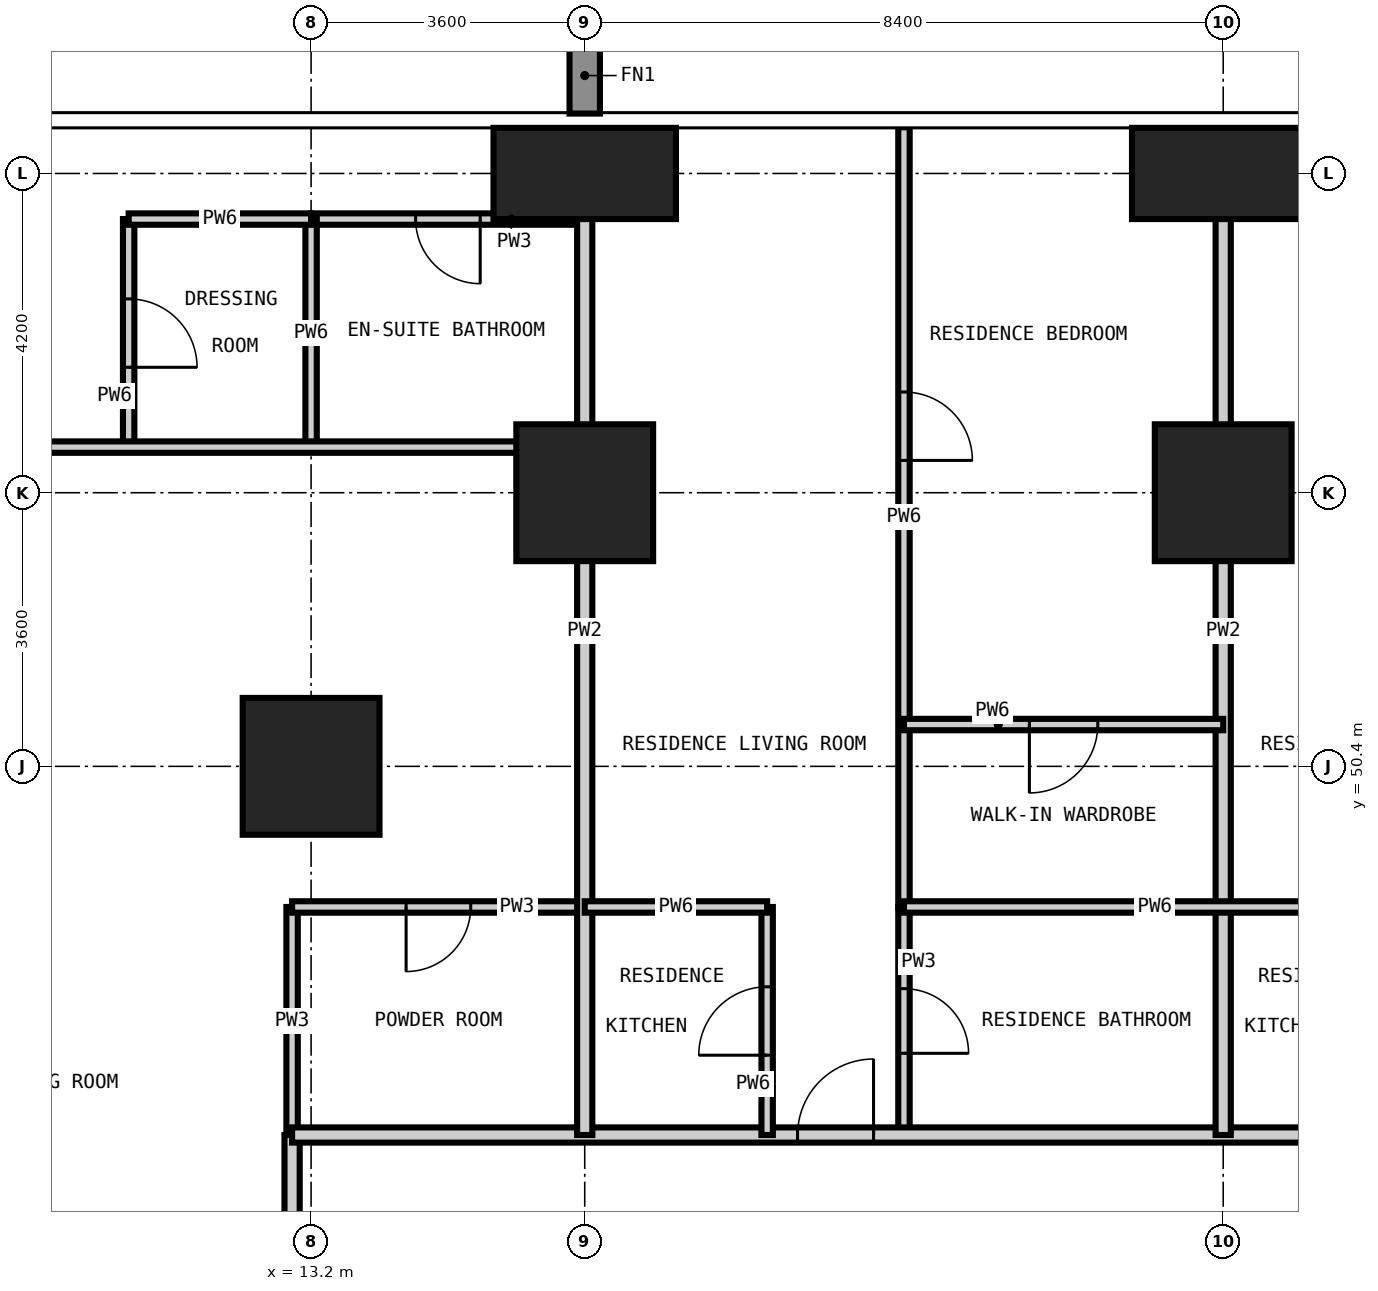
"""IFC4 building model, lengths in metres.
Left out: names, types, materials, properties, quantities, classifications, styles, units other than length and angle.
Written with IfcOpenShell. Run it as: python <this file> out.ifc"""

import sys

from ifc_helpers import new_model, si_unit, direction, frame, frame_2d, origin, origin_2d, place, context, subcontext, project, spatial, rectangle, extrude, element, fill, save


model = new_model("IFC4")
c1 = context("Model", 3, precision=1e-05, world=origin(), true_north=direction((0.0, 1.0)))
c2 = subcontext(c1, "Body", "Model", "MODEL_VIEW")
j1 = project(units=[si_unit("LENGTHUNIT", "METRE"), si_unit("PLANEANGLEUNIT", "RADIAN")], contexts=[c1])
p1 = place(None, origin())
s1 = spatial("IfcSite", under=j1, at=p1, CompositionType="ELEMENT")
p2 = place(p1, origin())
s2 = spatial("IfcBuilding", under=s1, at=p2, CompositionType="ELEMENT")
p3 = place(p2, frame((0.0, 0.0, 45.0)))
s3 = spatial("IfcBuildingStorey", under=s2, at=p3, CompositionType="ELEMENT", Elevation=45.0)
for number, where, z_axis, x_axis in (
    (1, (13.2, 50.4, -0.35), (0.0, 0.0, 1.0), (1.0, 0.0, 0.0)),
    (2, (16.8, 54.0, -0.35), (0.0, 0.0, 1.0), (1.0, 0.0, 0.0)),
):
    element("IfcColumn", number, at=place(p3, frame(where, z_axis=z_axis, x_axis=x_axis)), inside=s3, PredefinedType="COLUMN", context=c2, shape_type="SweptSolid", body=[
        extrude(rectangle(XDim=1.8, YDim=1.8, at=origin_2d()), origin(), (0.0, 0.0, 1.0), 3.6),
    ])
p4 = place(p3, frame((16.8, 58.2, -0.35), z_axis=(0.0, 0.0, 1.0), x_axis=(1.0, 0.0, 0.0)))
e3 = element("IfcColumn", 3, at=p4, inside=s3, PredefinedType="COLUMN", context=c2, shape_type="SweptSolid", body=[
    extrude(rectangle(XDim=2.4, YDim=1.2, at=origin_2d()), origin(), (0.0, 0.0, 1.0), 3.6),
])
p5 = place(p3, frame((25.2, 54.0, -0.35), z_axis=(0.0, 0.0, 1.0), x_axis=(1.0, 0.0, 0.0)))
e4 = element("IfcColumn", 4, at=p5, inside=s3, PredefinedType="COLUMN", context=c2, shape_type="SweptSolid", body=[
    extrude(rectangle(XDim=1.8, YDim=1.8, at=origin_2d()), origin(), (0.0, 0.0, 1.0), 3.6),
])
p6 = place(p3, frame((25.2, 58.2, -0.35), z_axis=(0.0, 0.0, 1.0), x_axis=(1.0, 0.0, 0.0)))
e5 = element("IfcColumn", 5, at=p6, inside=s3, PredefinedType="COLUMN", context=c2, shape_type="SweptSolid", body=[
    extrude(rectangle(XDim=2.4, YDim=1.2, at=origin_2d()), origin(), (0.0, 0.0, 1.0), 3.6),
])
p7 = place(p3, frame((12.95, 45.55, 0.0), z_axis=(0.0, 0.0, 1.0), x_axis=(0.0, 1.0, 0.0)))
e6 = element("IfcWall", 6, at=p7, inside=s3, PredefinedType="PARTITIONING", context=c2, shape_type="SweptSolid", body=[
    extrude(rectangle(XDim=3.0, YDim=0.15, at=frame_2d((1.5, 0.0))), origin(), (0.0, 0.0, 1.0), 3.25),
])
p8 = place(p3, frame((21.0, 45.55, 0.0), z_axis=(0.0, 0.0, 1.0), x_axis=(0.0, 1.0, 0.0)))
e7 = element("IfcWall", 7, at=p8, inside=s3, PredefinedType="PARTITIONING", context=c2, shape_type="SweptSolid", body=[
    extrude(rectangle(XDim=3.0, YDim=0.15, at=frame_2d((1.5, 0.0))), origin(), (0.0, 0.0, 1.0), 3.25),
])
p9 = place(p8, frame((1.075, 0.0, 0.0)))
e8 = element("IfcOpeningElement", 8, at=p9, cuts=e7, PredefinedType="OPENING", context=c2, shape_type="SweptSolid", body=[
    extrude(rectangle(XDim=0.85, YDim=2.1, at=frame_2d((0.425, 1.05))), frame((0.0, 0.085, 0.0), z_axis=(0.0, -1.0, 0.0), x_axis=(1.0, 0.0, 0.0)), (0.0, 0.0, 1.0), 0.17),
])
p10 = place(p3, frame((12.95, 48.55, 0.0), z_axis=(0.0, 0.0, 1.0), x_axis=(1.0, 0.0, 0.0)))
e9 = element("IfcWall", 9, at=p10, inside=s3, PredefinedType="PARTITIONING", context=c2, shape_type="SweptSolid", body=[
    extrude(rectangle(XDim=3.85, YDim=0.15, at=frame_2d((1.925, 0.0))), origin(), (0.0, 0.0, 1.0), 3.25),
])
p11 = place(p10, frame((1.5, 0.0, 0.0)))
e10 = element("IfcOpeningElement", 10, at=p11, cuts=e9, PredefinedType="OPENING", context=c2, shape_type="SweptSolid", body=[
    extrude(rectangle(XDim=0.85, YDim=2.1, at=frame_2d((0.425, 1.05))), frame((0.0, 0.085, 0.0), z_axis=(0.0, -1.0, 0.0), x_axis=(1.0, 0.0, 0.0)), (0.0, 0.0, 1.0), 0.17),
])
p12 = place(p3, frame((13.2, 57.6, 0.0), z_axis=(0.0, 0.0, 1.0), x_axis=(1.0, 0.0, 0.0)))
e11 = element("IfcWall", 11, at=p12, inside=s3, PredefinedType="PARTITIONING", context=c2, shape_type="SweptSolid", body=[
    extrude(rectangle(XDim=3.6, YDim=0.15, at=frame_2d((1.8, 0.0))), origin(), (0.0, 0.0, 1.0), 3.25),
])
p13 = place(p12, frame((1.375, 0.0, 0.0)))
e12 = element("IfcOpeningElement", 12, at=p13, cuts=e11, PredefinedType="OPENING", context=c2, shape_type="SweptSolid", body=[
    extrude(rectangle(XDim=0.85, YDim=2.1, at=frame_2d((0.425, 1.05))), frame((0.0, 0.085, 0.0), z_axis=(0.0, -1.0, 0.0), x_axis=(1.0, 0.0, 0.0)), (0.0, 0.0, 1.0), 0.17),
])
p14 = place(p3, frame((12.95, 12.95, 0.0), z_axis=(0.0, 0.0, 1.0), x_axis=(0.0, 1.0, 0.0)))
e13 = element("IfcWall", 13, at=p14, inside=s3, PredefinedType="PARTITIONING", context=c2, shape_type="SweptSolid", body=[
    extrude(rectangle(XDim=32.6, YDim=0.2, at=frame_2d((16.3, 0.0))), origin(), (0.0, 0.0, 1.0), 3.25),
])
p15 = place(p14, frame((8.45, 0.0, 0.0)))
e14 = element("IfcOpeningElement", 14, at=p15, cuts=e13, PredefinedType="OPENING", context=c2, shape_type="SweptSolid", body=[
    extrude(rectangle(XDim=1.0, YDim=2.2, at=frame_2d((0.5, 1.1))), frame((0.0, 0.11, 0.0), z_axis=(0.0, -1.0, 0.0), x_axis=(1.0, 0.0, 0.0)), (0.0, 0.0, 1.0), 0.22),
])
p16 = place(p14, frame((16.7, 0.0, 0.0)))
e15 = element("IfcOpeningElement", 15, at=p16, cuts=e13, PredefinedType="OPENING", context=c2, shape_type="SweptSolid", body=[
    extrude(rectangle(XDim=1.0, YDim=2.2, at=frame_2d((0.5, 1.1))), frame((0.0, 0.11, 0.0), z_axis=(0.0, -1.0, 0.0), x_axis=(1.0, 0.0, 0.0)), (0.0, 0.0, 1.0), 0.22),
])
p17 = place(p14, frame((23.6, 0.0, 0.0)))
e16 = element("IfcOpeningElement", 16, at=p17, cuts=e13, PredefinedType="OPENING", context=c2, shape_type="SweptSolid", body=[
    extrude(rectangle(XDim=1.0, YDim=2.2, at=frame_2d((0.5, 1.1))), frame((0.0, 0.11, 0.0), z_axis=(0.0, -1.0, 0.0), x_axis=(1.0, 0.0, 0.0)), (0.0, 0.0, 1.0), 0.22),
])
p18 = place(p14, frame((25.1, 0.0, 0.0)))
e17 = element("IfcOpeningElement", 17, at=p18, cuts=e13, PredefinedType="OPENING", context=c2, shape_type="SweptSolid", body=[
    extrude(rectangle(XDim=1.0, YDim=2.2, at=frame_2d((0.5, 1.1))), frame((0.0, 0.11, 0.0), z_axis=(0.0, -1.0, 0.0), x_axis=(1.0, 0.0, 0.0)), (0.0, 0.0, 1.0), 0.22),
])
p19 = place(p14, frame((1.425, 0.0, 0.0)))
e18 = element("IfcOpeningElement", 18, at=p19, cuts=e13, PredefinedType="OPENING", context=c2, shape_type="SweptSolid", body=[
    extrude(rectangle(XDim=1.0, YDim=2.2, at=frame_2d((0.5, 1.1))), frame((0.0, 0.11, 0.0), z_axis=(0.0, -1.0, 0.0), x_axis=(1.0, 0.0, 0.0)), (0.0, 0.0, 1.0), 0.22),
])
p20 = place(p14, frame((30.325, 0.0, 0.0)))
e19 = element("IfcOpeningElement", 19, at=p20, cuts=e13, PredefinedType="OPENING", context=c2, shape_type="SweptSolid", body=[
    extrude(rectangle(XDim=1.0, YDim=2.2, at=frame_2d((0.5, 1.1))), frame((0.0, 0.11, 0.0), z_axis=(0.0, -1.0, 0.0), x_axis=(1.0, 0.0, 0.0)), (0.0, 0.0, 1.0), 0.22),
])
p21 = place(p3, frame((12.95, 45.55, 0.0), z_axis=(0.0, 0.0, 1.0), x_axis=(1.0, 0.0, 0.0)))
e20 = element("IfcWall", 20, at=p21, inside=s3, PredefinedType="PARTITIONING", context=c2, shape_type="SweptSolid", body=[
    extrude(rectangle(XDim=32.3, YDim=0.2, at=frame_2d((16.15, 0.0))), origin(), (0.0, 0.0, 1.0), 3.25),
])
p22 = place(p21, frame((6.65, 0.0, 0.0)))
e21 = element("IfcOpeningElement", 21, at=p22, cuts=e20, PredefinedType="OPENING", context=c2, shape_type="SweptSolid", body=[
    extrude(rectangle(XDim=1.0, YDim=2.2, at=frame_2d((0.5, 1.1))), frame((0.0, 0.11, 0.0), z_axis=(0.0, -1.0, 0.0), x_axis=(1.0, 0.0, 0.0)), (0.0, 0.0, 1.0), 0.22),
])
p23 = place(p21, frame((15.05, 0.0, 0.0)))
e22 = element("IfcOpeningElement", 22, at=p23, cuts=e20, PredefinedType="OPENING", context=c2, shape_type="SweptSolid", body=[
    extrude(rectangle(XDim=1.0, YDim=2.2, at=frame_2d((0.5, 1.1))), frame((0.0, 0.11, 0.0), z_axis=(0.0, -1.0, 0.0), x_axis=(1.0, 0.0, 0.0)), (0.0, 0.0, 1.0), 0.22),
])
p24 = place(p21, frame((23.45, 0.0, 0.0)))
e23 = element("IfcOpeningElement", 23, at=p24, cuts=e20, PredefinedType="OPENING", context=c2, shape_type="SweptSolid", body=[
    extrude(rectangle(XDim=1.0, YDim=2.2, at=frame_2d((0.5, 1.1))), frame((0.0, 0.11, 0.0), z_axis=(0.0, -1.0, 0.0), x_axis=(1.0, 0.0, 0.0)), (0.0, 0.0, 1.0), 0.22),
])
for number, where, z_axis, x_axis in (
    (24, (16.8, 45.55, 0.0), (0.0, 0.0, 1.0), (0.0, 1.0, 0.0)),
    (25, (25.2, 45.55, 0.0), (0.0, 0.0, 1.0), (0.0, 1.0, 0.0)),
):
    element("IfcWall", number, at=place(p3, frame(where, z_axis=z_axis, x_axis=x_axis)), inside=s3, PredefinedType="PARTITIONING", context=c2, shape_type="SweptSolid", body=[
        extrude(rectangle(XDim=13.258, YDim=0.2, at=frame_2d((6.629, 0.0))), origin(), (0.0, 0.0, 1.0), 3.25),
    ])
p25 = place(p3, frame((10.8, 54.6, 0.0), z_axis=(0.0, 0.0, 1.0), x_axis=(0.0, 1.0, 0.0)))
e26 = element("IfcWall", 26, at=p25, inside=s3, PredefinedType="PARTITIONING", context=c2, shape_type="SweptSolid", body=[
    extrude(rectangle(XDim=3.0, YDim=0.15, at=frame_2d((1.5, 0.0))), origin(), (0.0, 0.0, 1.0), 3.25),
])
p26 = place(p25, frame((1.05, 0.0, 0.0)))
e27 = element("IfcOpeningElement", 27, at=p26, cuts=e26, PredefinedType="OPENING", context=c2, shape_type="SweptSolid", body=[
    extrude(rectangle(XDim=0.9, YDim=2.1, at=frame_2d((0.45, 1.05))), frame((0.0, 0.085, 0.0), z_axis=(0.0, -1.0, 0.0), x_axis=(1.0, 0.0, 0.0)), (0.0, 0.0, 1.0), 0.17),
])
p27 = place(p3, frame((13.2, 54.6, 0.0), z_axis=(0.0, 0.0, 1.0), x_axis=(0.0, 1.0, 0.0)))
e28 = element("IfcWall", 28, at=p27, inside=s3, PredefinedType="PARTITIONING", context=c2, shape_type="SweptSolid", body=[
    extrude(rectangle(XDim=3.0, YDim=0.15, at=frame_2d((1.5, 0.0))), origin(), (0.0, 0.0, 1.0), 3.25),
])
p28 = place(p3, frame((19.2, 45.55, 0.0), z_axis=(0.0, 0.0, 1.0), x_axis=(0.0, 1.0, 0.0)))
e29 = element("IfcWall", 29, at=p28, inside=s3, PredefinedType="PARTITIONING", context=c2, shape_type="SweptSolid", body=[
    extrude(rectangle(XDim=3.0, YDim=0.15, at=frame_2d((1.5, 0.0))), origin(), (0.0, 0.0, 1.0), 3.25),
])
p29 = place(p28, frame((1.05, 0.0, 0.0)))
e30 = element("IfcOpeningElement", 30, at=p29, cuts=e29, PredefinedType="OPENING", context=c2, shape_type="SweptSolid", body=[
    extrude(rectangle(XDim=0.9, YDim=2.1, at=frame_2d((0.45, 1.05))), frame((0.0, 0.085, 0.0), z_axis=(0.0, -1.0, 0.0), x_axis=(1.0, 0.0, 0.0)), (0.0, 0.0, 1.0), 0.17),
])
p30 = place(p3, frame((21.0, 48.55, 0.0), z_axis=(0.0, 0.0, 1.0), x_axis=(0.0, 1.0, 0.0)))
e31 = element("IfcWall", 31, at=p30, inside=s3, PredefinedType="PARTITIONING", context=c2, shape_type="SweptSolid", body=[
    extrude(rectangle(XDim=10.258, YDim=0.15, at=frame_2d((5.129, 0.0))), origin(), (0.0, 0.0, 1.0), 3.25),
])
p31 = place(p30, frame((5.875, 0.0, 0.0)))
e32 = element("IfcOpeningElement", 32, at=p31, cuts=e31, PredefinedType="OPENING", context=c2, shape_type="SweptSolid", body=[
    extrude(rectangle(XDim=0.9, YDim=2.1, at=frame_2d((0.45, 1.05))), frame((0.0, 0.085, 0.0), z_axis=(0.0, -1.0, 0.0), x_axis=(1.0, 0.0, 0.0)), (0.0, 0.0, 1.0), 0.17),
])
p32 = place(p3, frame((16.8, 48.55, 0.0), z_axis=(0.0, 0.0, 1.0), x_axis=(1.0, 0.0, 0.0)))
e33 = element("IfcWall", 33, at=p32, inside=s3, PredefinedType="PARTITIONING", context=c2, shape_type="SweptSolid", body=[
    extrude(rectangle(XDim=2.4, YDim=0.15, at=frame_2d((1.2, 0.0))), origin(), (0.0, 0.0, 1.0), 3.25),
])
p33 = place(p3, frame((21.0, 48.55, 0.0), z_axis=(0.0, 0.0, 1.0), x_axis=(1.0, 0.0, 0.0)))
e34 = element("IfcWall", 34, at=p33, inside=s3, PredefinedType="PARTITIONING", context=c2, shape_type="SweptSolid", body=[
    extrude(rectangle(XDim=6.6, YDim=0.15, at=frame_2d((3.3, 0.0))), origin(), (0.0, 0.0, 1.0), 3.25),
])
p34 = place(p3, frame((21.0, 50.95, 0.0), z_axis=(0.0, 0.0, 1.0), x_axis=(1.0, 0.0, 0.0)))
e35 = element("IfcWall", 35, at=p34, inside=s3, PredefinedType="PARTITIONING", context=c2, shape_type="SweptSolid", body=[
    extrude(rectangle(XDim=4.2, YDim=0.15, at=frame_2d((2.1, 0.0))), origin(), (0.0, 0.0, 1.0), 3.25),
])
p35 = place(p34, frame((1.65, 0.0, 0.0)))
e36 = element("IfcOpeningElement", 36, at=p35, cuts=e35, PredefinedType="OPENING", context=c2, shape_type="SweptSolid", body=[
    extrude(rectangle(XDim=0.9, YDim=2.1, at=frame_2d((0.45, 1.05))), frame((0.0, 0.085, 0.0), z_axis=(0.0, -1.0, 0.0), x_axis=(1.0, 0.0, 0.0)), (0.0, 0.0, 1.0), 0.17),
])
p36 = place(p3, frame((-0.008, 54.6, 0.0), z_axis=(0.0, 0.0, 1.0), x_axis=(1.0, 0.0, 0.0)))
e37 = element("IfcWall", 37, at=p36, inside=s3, PredefinedType="PARTITIONING", context=c2, shape_type="SweptSolid", body=[
    extrude(rectangle(XDim=16.808, YDim=0.15, at=frame_2d((8.404, 0.0))), origin(), (0.0, 0.0, 1.0), 3.25),
])
p37 = place(p36, frame((4.958, 0.0, 0.0)))
e38 = element("IfcOpeningElement", 38, at=p37, cuts=e37, PredefinedType="OPENING", context=c2, shape_type="SweptSolid", body=[
    extrude(rectangle(XDim=0.9, YDim=2.1, at=frame_2d((0.45, 1.05))), frame((0.0, 0.085, 0.0), z_axis=(0.0, -1.0, 0.0), x_axis=(1.0, 0.0, 0.0)), (0.0, 0.0, 1.0), 0.17),
])
p38 = place(p3, frame((10.8, 57.6, 0.0), z_axis=(0.0, 0.0, 1.0), x_axis=(1.0, 0.0, 0.0)))
e39 = element("IfcWall", 39, at=p38, inside=s3, PredefinedType="PARTITIONING", context=c2, shape_type="SweptSolid", body=[
    extrude(rectangle(XDim=2.4, YDim=0.15, at=frame_2d((1.2, 0.0))), origin(), (0.0, 0.0, 1.0), 3.25),
])
p39 = place(p22, origin())
e40 = element("IfcDoor", 40, at=p39, inside=s3, OperationType="SINGLE_SWING_RIGHT", PredefinedType="DOOR", context=c2, shape_type="SweptSolid", body=[
    extrude(rectangle(XDim=1.0, YDim=2.2, at=frame_2d((0.5, 1.1))), frame((0.0, 0.025, 0.0), z_axis=(0.0, -1.0, 0.0), x_axis=(1.0, 0.0, 0.0)), (0.0, 0.0, 1.0), 0.05),
])
fill(e21, e40)
p40 = place(p29, origin())
e41 = element("IfcDoor", 41, at=p40, inside=s3, OperationType="SINGLE_SWING_LEFT", PredefinedType="DOOR", context=c2, shape_type="SweptSolid", body=[
    extrude(rectangle(XDim=0.9, YDim=2.1, at=frame_2d((0.45, 1.05))), frame((0.0, 0.025, 0.0), z_axis=(0.0, -1.0, 0.0), x_axis=(1.0, 0.0, 0.0)), (0.0, 0.0, 1.0), 0.05),
])
fill(e30, e41)
p41 = place(p9, frame((0.85, 0.0, 0.0), z_axis=(0.0, 0.0, 1.0), x_axis=(-1.0, 0.0, 0.0)))
e42 = element("IfcDoor", 42, at=p41, inside=s3, OperationType="SINGLE_SWING_RIGHT", PredefinedType="DOOR", context=c2, shape_type="SweptSolid", body=[
    extrude(rectangle(XDim=0.85, YDim=2.1, at=frame_2d((0.425, 1.05))), frame((0.0, 0.025, 0.0), z_axis=(0.0, -1.0, 0.0), x_axis=(1.0, 0.0, 0.0)), (0.0, 0.0, 1.0), 0.05),
])
fill(e8, e42)
p42 = place(p35, frame((0.9, 0.0, 0.0), z_axis=(0.0, 0.0, 1.0), x_axis=(-1.0, 0.0, 0.0)))
e43 = element("IfcDoor", 43, at=p42, inside=s3, OperationType="SINGLE_SWING_RIGHT", PredefinedType="DOOR", context=c2, shape_type="SweptSolid", body=[
    extrude(rectangle(XDim=0.9, YDim=2.1, at=frame_2d((0.45, 1.05))), frame((0.0, 0.025, 0.0), z_axis=(0.0, -1.0, 0.0), x_axis=(1.0, 0.0, 0.0)), (0.0, 0.0, 1.0), 0.05),
])
fill(e36, e43)
p43 = place(p31, frame((0.9, 0.0, 0.0), z_axis=(0.0, 0.0, 1.0), x_axis=(-1.0, 0.0, 0.0)))
e44 = element("IfcDoor", 44, at=p43, inside=s3, OperationType="SINGLE_SWING_RIGHT", PredefinedType="DOOR", context=c2, shape_type="SweptSolid", body=[
    extrude(rectangle(XDim=0.9, YDim=2.1, at=frame_2d((0.45, 1.05))), frame((0.0, 0.025, 0.0), z_axis=(0.0, -1.0, 0.0), x_axis=(1.0, 0.0, 0.0)), (0.0, 0.0, 1.0), 0.05),
])
fill(e32, e44)
p44 = place(p11, frame((0.85, 0.0, 0.0), z_axis=(0.0, 0.0, 1.0), x_axis=(-1.0, 0.0, 0.0)))
e45 = element("IfcDoor", 45, at=p44, inside=s3, OperationType="SINGLE_SWING_RIGHT", PredefinedType="DOOR", context=c2, shape_type="SweptSolid", body=[
    extrude(rectangle(XDim=0.85, YDim=2.1, at=frame_2d((0.425, 1.05))), frame((0.0, 0.025, 0.0), z_axis=(0.0, -1.0, 0.0), x_axis=(1.0, 0.0, 0.0)), (0.0, 0.0, 1.0), 0.05),
])
fill(e10, e45)
p45 = place(p13, frame((0.85, 0.0, 0.0), z_axis=(0.0, 0.0, 1.0), x_axis=(-1.0, 0.0, 0.0)))
e46 = element("IfcDoor", 46, at=p45, inside=s3, OperationType="SINGLE_SWING_LEFT", PredefinedType="DOOR", context=c2, shape_type="SweptSolid", body=[
    extrude(rectangle(XDim=0.85, YDim=2.1, at=frame_2d((0.425, 1.05))), frame((0.0, 0.025, 0.0), z_axis=(0.0, -1.0, 0.0), x_axis=(1.0, 0.0, 0.0)), (0.0, 0.0, 1.0), 0.05),
])
fill(e12, e46)
p46 = place(p26, frame((0.9, 0.0, 0.0), z_axis=(0.0, 0.0, 1.0), x_axis=(-1.0, 0.0, 0.0)))
e47 = element("IfcDoor", 47, at=p46, inside=s3, OperationType="SINGLE_SWING_RIGHT", PredefinedType="DOOR", context=c2, shape_type="SweptSolid", body=[
    extrude(rectangle(XDim=0.9, YDim=2.1, at=frame_2d((0.45, 1.05))), frame((0.0, 0.025, 0.0), z_axis=(0.0, -1.0, 0.0), x_axis=(1.0, 0.0, 0.0)), (0.0, 0.0, 1.0), 0.05),
])
fill(e27, e47)
save(model, sys.argv[1])
